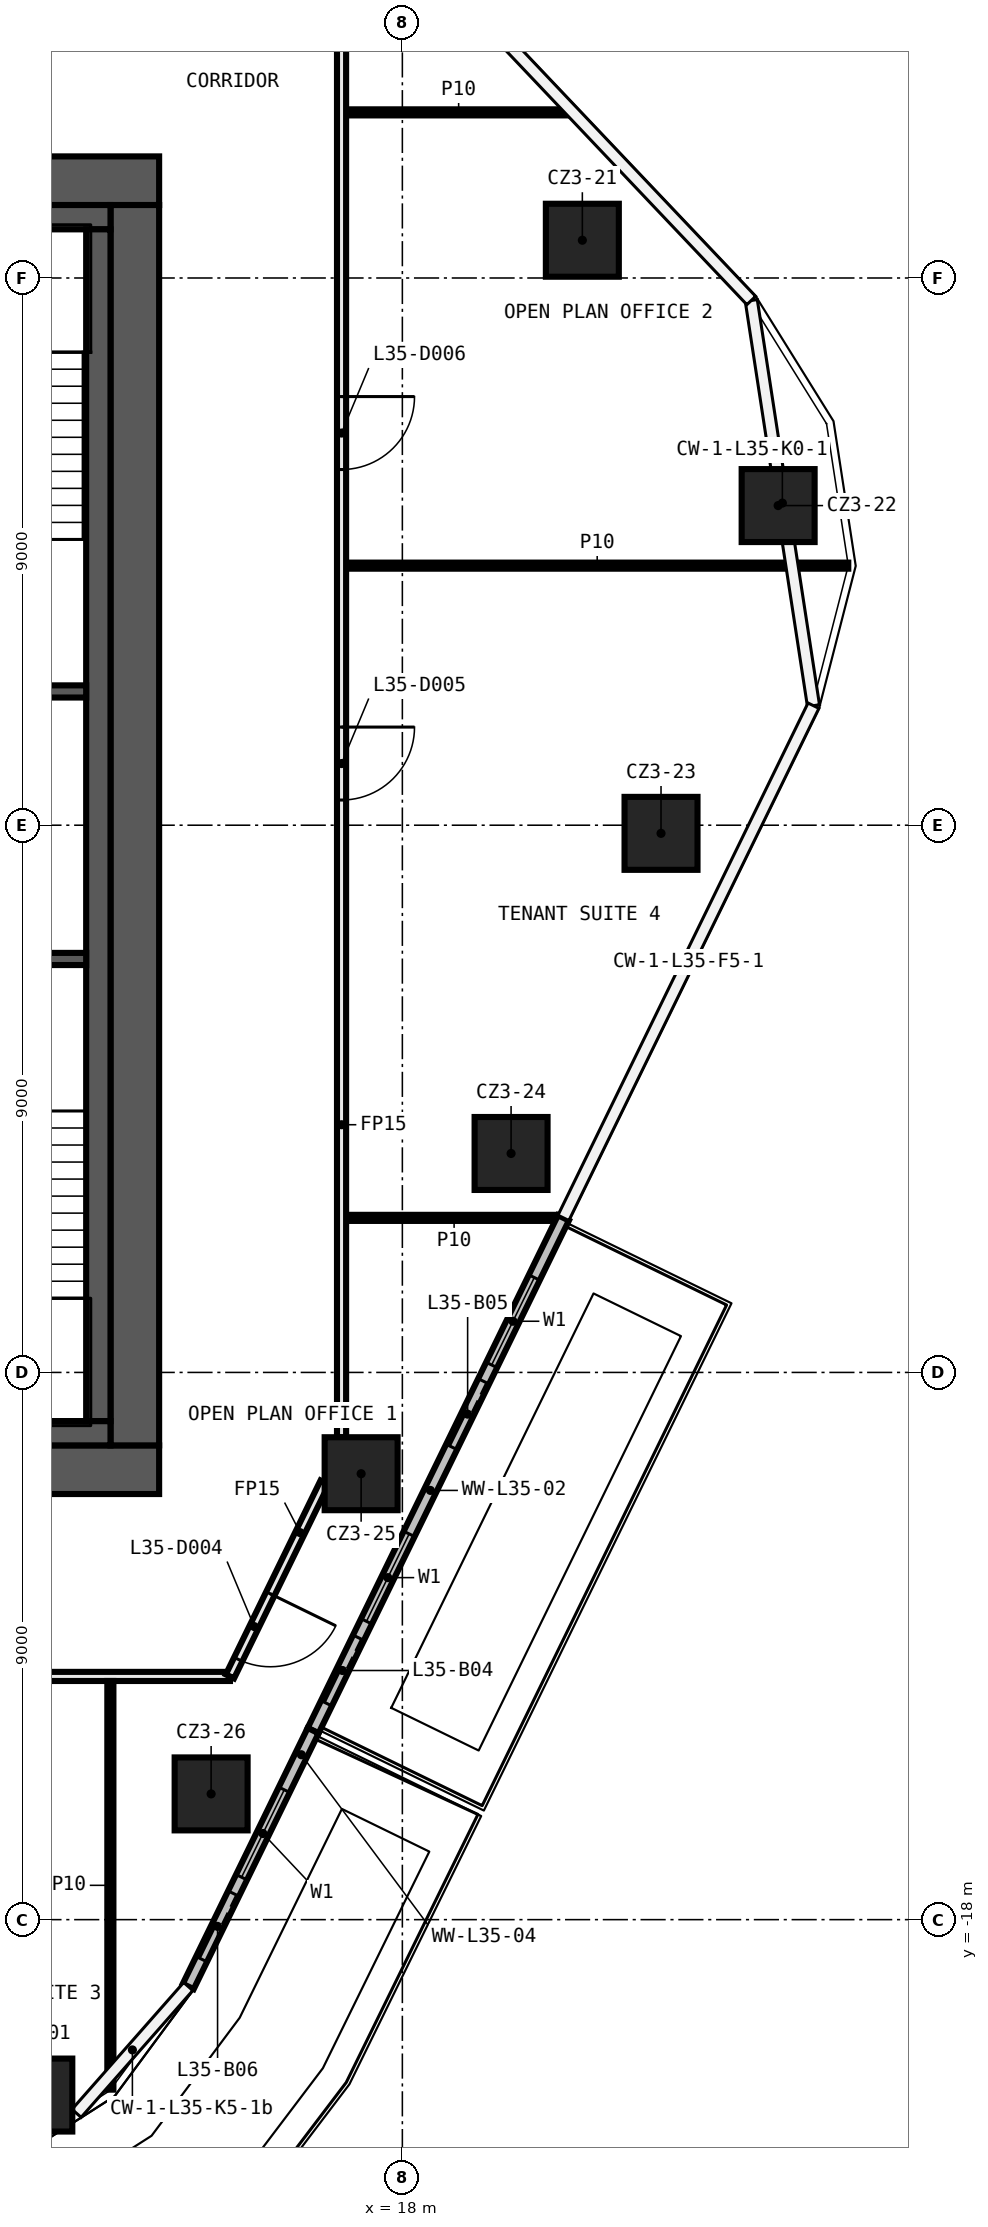
"""IFC4 building model, lengths in metres.
Left out: names, types, materials, properties, quantities, classifications, styles, units other than length and angle.
Written with IfcOpenShell. Run it as: python <this file> out.ifc"""

import sys

from ifc_helpers import new_model, si_unit, direction, frame, frame_2d, origin, origin_2d, place, context, subcontext, project, spatial, rectangle, extrude, element, fill, save


model = new_model("IFC4")
c1 = context("Model", 3, precision=1e-05, world=origin(), true_north=direction((0.0, 1.0)))
c2 = subcontext(c1, "Body", "Model", "MODEL_VIEW")
j1 = project(units=[si_unit("LENGTHUNIT", "METRE"), si_unit("PLANEANGLEUNIT", "RADIAN")], contexts=[c1])
p1 = place(None, origin())
s1 = spatial("IfcSite", under=j1, at=p1, CompositionType="ELEMENT")
p2 = place(p1, origin())
s2 = spatial("IfcBuilding", under=s1, at=p2, CompositionType="ELEMENT")
p3 = place(p2, frame((0.0, 0.0, 162.8)))
s3 = spatial("IfcBuildingStorey", under=s2, at=p3, CompositionType="ELEMENT", Elevation=162.8)
for number, where, z_axis, x_axis in (
    (1, (11.972, -20.885, 0.0), (0.0, 0.0, 1.0), (1.0, 0.0, 0.0)),
    (2, (20.96, 9.621, 0.0), (0.0, 0.0, 1.0), (1.0, 0.0, 0.0)),
    (3, (24.18, 5.257, 0.0), (0.0, 0.0, 1.0), (1.0, 0.0, 0.0)),
    (4, (22.254, -0.134, 0.0), (0.0, 0.0, 1.0), (1.0, 0.0, 0.0)),
    (5, (19.788, -5.399, 0.0), (0.0, 0.0, 1.0), (1.0, 0.0, 0.0)),
    (6, (17.322, -10.666, 0.0), (0.0, 0.0, 1.0), (1.0, 0.0, 0.0)),
    (7, (14.855, -15.932, 0.0), (0.0, 0.0, 1.0), (1.0, 0.0, 0.0)),
):
    element("IfcColumn", number, at=place(p3, frame(where, z_axis=z_axis, x_axis=x_axis)), inside=s3, PredefinedType="COLUMN", context=c2, shape_type="SweptSolid", body=[
        extrude(rectangle(XDim=1.2, YDim=1.2, at=origin_2d()), origin(), (0.0, 0.0, 1.0), 3.82),
    ])
p4 = place(p3, frame((15.165, -14.0, 0.0), z_axis=(0.0, 0.0, 1.0), x_axis=(-1.0, 0.0, 0.0)))
e8 = element("IfcWall", 8, at=p4, inside=s3, PredefinedType="PARTITIONING", context=c2, shape_type="SweptSolid", body=[
    extrude(rectangle(XDim=24.24, YDim=0.15, at=frame_2d((12.12, 0.0))), origin(), (0.0, 0.0, 1.0), 3.82),
])
p5 = place(p4, frame((15.788, 0.0, 0.0)))
e9 = element("IfcOpeningElement", 9, at=p5, cuts=e8, PredefinedType="OPENING", context=c2, shape_type="SweptSolid", body=[
    extrude(rectangle(XDim=1.2, YDim=2.1, at=frame_2d((0.6, 1.05))), frame((0.0, 0.085, 0.0), z_axis=(0.0, -1.0, 0.0), x_axis=(1.0, 0.0, 0.0)), (0.0, 0.0, 1.0), 0.17),
])
p6 = place(p4, frame((7.379, 0.0, 0.0)))
e10 = element("IfcOpeningElement", 10, at=p6, cuts=e8, PredefinedType="OPENING", context=c2, shape_type="SweptSolid", body=[
    extrude(rectangle(XDim=1.2, YDim=2.1, at=frame_2d((0.6, 1.05))), frame((0.0, 0.085, 0.0), z_axis=(0.0, -1.0, 0.0), x_axis=(1.0, 0.0, 0.0)), (0.0, 0.0, 1.0), 0.17),
])
p7 = place(p4, frame((3.323, 0.0, 0.0)))
e11 = element("IfcOpeningElement", 11, at=p7, cuts=e8, PredefinedType="OPENING", context=c2, shape_type="SweptSolid", body=[
    extrude(rectangle(XDim=1.2, YDim=2.1, at=frame_2d((0.6, 1.05))), frame((0.0, 0.085, 0.0), z_axis=(0.0, -1.0, 0.0), x_axis=(1.0, 0.0, 0.0)), (0.0, 0.0, 1.0), 0.17),
])
p8 = place(p3, frame((17.075, -6.458, 0.0), z_axis=(0.0, 0.0, 1.0), x_axis=(1.0, 0.0, 0.0)))
e12 = element("IfcWall", 12, at=p8, inside=s3, PredefinedType="PARTITIONING", context=c2, shape_type="SweptSolid", body=[
    extrude(rectangle(XDim=3.552, YDim=0.1, at=frame_2d((1.776, 0.0))), origin(), (0.0, 0.0, 1.0), 3.82),
])
p9 = place(p3, frame((17.075, 4.269, 0.0), z_axis=(0.0, 0.0, 1.0), x_axis=(1.0, 0.0, 0.0)))
e13 = element("IfcWall", 13, at=p9, inside=s3, PredefinedType="PARTITIONING", context=c2, shape_type="SweptSolid", body=[
    extrude(rectangle(XDim=8.259, YDim=0.1, at=frame_2d((4.129, 0.0))), origin(), (0.0, 0.0, 1.0), 3.82),
])
p10 = place(p3, frame((17.075, 11.724, 0.0), z_axis=(0.0, 0.0, 1.0), x_axis=(1.0, 0.0, 0.0)))
e14 = element("IfcWall", 14, at=p10, inside=s3, PredefinedType="PARTITIONING", context=c2, shape_type="SweptSolid", body=[
    extrude(rectangle(XDim=3.701, YDim=0.1, at=frame_2d((1.851, 0.0))), origin(), (0.0, 0.0, 1.0), 3.82),
])
p11 = place(p3, frame((16.722, -10.809, 0.0), z_axis=(0.0, 0.0, 1.0), x_axis=(-0.438666135365, -0.898650110824, 0.0)))
e15 = element("IfcWall", 15, at=p11, inside=s3, PredefinedType="PARTITIONING", context=c2, shape_type="SweptSolid", body=[
    extrude(rectangle(XDim=3.55, YDim=0.15, at=frame_2d((1.775, 0.0))), origin(), (0.0, 0.0, 1.0), 3.82),
])
p12 = place(p11, frame((2.038, 0.0, 0.0)))
e16 = element("IfcOpeningElement", 16, at=p12, cuts=e15, PredefinedType="OPENING", context=c2, shape_type="SweptSolid", body=[
    extrude(rectangle(XDim=1.2, YDim=2.1, at=frame_2d((0.6, 1.05))), frame((0.0, 0.085, 0.0), z_axis=(0.0, -1.0, 0.0), x_axis=(1.0, 0.0, 0.0)), (0.0, 0.0, 1.0), 0.17),
])
p13 = place(p3, frame((17.0, 13.106, 0.0), z_axis=(0.0, 0.0, 1.0), x_axis=(0.0, -1.0, 0.0)))
e17 = element("IfcWall", 17, at=p13, inside=s3, PredefinedType="PARTITIONING", context=c2, shape_type="SweptSolid", body=[
    extrude(rectangle(XDim=23.172, YDim=0.15, at=frame_2d((11.586, 0.0))), origin(), (0.0, 0.0, 1.0), 3.82),
])
p14 = place(p13, frame((11.492, 0.0, 0.0)))
e18 = element("IfcOpeningElement", 18, at=p14, cuts=e17, PredefinedType="OPENING", context=c2, shape_type="SweptSolid", body=[
    extrude(rectangle(XDim=1.2, YDim=2.1, at=frame_2d((0.6, 1.05))), frame((0.0, 0.085, 0.0), z_axis=(0.0, -1.0, 0.0), x_axis=(1.0, 0.0, 0.0)), (0.0, 0.0, 1.0), 0.17),
])
p15 = place(p13, frame((6.056, 0.0, 0.0)))
e19 = element("IfcOpeningElement", 19, at=p15, cuts=e17, PredefinedType="OPENING", context=c2, shape_type="SweptSolid", body=[
    extrude(rectangle(XDim=1.2, YDim=2.1, at=frame_2d((0.6, 1.05))), frame((0.0, 0.085, 0.0), z_axis=(0.0, -1.0, 0.0), x_axis=(1.0, 0.0, 0.0)), (0.0, 0.0, 1.0), 0.17),
])
p16 = place(p3, frame((13.198, -20.796, 0.0), z_axis=(0.0, 0.0, 1.0), x_axis=(0.0, 1.0, 0.0)))
e20 = element("IfcWall", 20, at=p16, inside=s3, PredefinedType="PARTITIONING", context=c2, shape_type="SweptSolid", body=[
    extrude(rectangle(XDim=6.721, YDim=0.1, at=frame_2d((3.361, 0.0))), origin(), (0.0, 0.0, 1.0), 3.82),
])
p17 = place(p3, frame((16.533, -14.891, 0.0), z_axis=(0.0, 0.0, 1.0), x_axis=(0.438659913387, 0.898653147987, 0.0)))
e21 = element("IfcWall", 21, at=p17, inside=s3, PredefinedType="SOLIDWALL", context=c2, shape_type="SweptSolid", body=[
    extrude(rectangle(XDim=9.384, YDim=0.2, at=frame_2d((4.692, 0.0))), origin(), (0.0, 0.0, 1.0), 3.82),
])
p18 = place(p17, frame((2.0, 0.0, 0.6)))
e22 = element("IfcOpeningElement", 22, at=p18, cuts=e21, PredefinedType="OPENING", context=c2, shape_type="SweptSolid", body=[
    extrude(rectangle(XDim=1.6, YDim=2.4, at=frame_2d((0.8, 1.2))), frame((0.0, 0.11, 0.0), z_axis=(0.0, -1.0, 0.0), x_axis=(1.0, 0.0, 0.0)), (0.0, 0.0, 1.0), 0.22),
])
p19 = place(p17, frame((0.5, 0.0, 0.0)))
e23 = element("IfcOpeningElement", 23, at=p19, cuts=e21, PredefinedType="OPENING", context=c2, shape_type="SweptSolid", body=[
    extrude(rectangle(XDim=1.2, YDim=2.4, at=frame_2d((0.6, 1.2))), frame((0.0, 0.11, 0.0), z_axis=(0.0, -1.0, 0.0), x_axis=(1.0, 0.0, 0.0)), (0.0, 0.0, 1.0), 0.22),
])
p20 = place(p17, frame((6.692, 0.0, 0.6)))
e24 = element("IfcOpeningElement", 24, at=p20, cuts=e21, PredefinedType="OPENING", context=c2, shape_type="SweptSolid", body=[
    extrude(rectangle(XDim=1.6, YDim=2.4, at=frame_2d((0.8, 1.2))), frame((0.0, 0.11, 0.0), z_axis=(0.0, -1.0, 0.0), x_axis=(1.0, 0.0, 0.0)), (0.0, 0.0, 1.0), 0.22),
])
p21 = place(p17, frame((5.192, 0.0, 0.0)))
e25 = element("IfcOpeningElement", 25, at=p21, cuts=e21, PredefinedType="OPENING", context=c2, shape_type="SweptSolid", body=[
    extrude(rectangle(XDim=1.2, YDim=2.4, at=frame_2d((0.6, 1.2))), frame((0.0, 0.11, 0.0), z_axis=(0.0, -1.0, 0.0), x_axis=(1.0, 0.0, 0.0)), (0.0, 0.0, 1.0), 0.22),
])
p22 = place(p3, frame((14.479, -19.099, 0.0), z_axis=(0.0, 0.0, 1.0), x_axis=(0.438663973521, 0.898651166101, 0.0)))
e26 = element("IfcWall", 26, at=p22, inside=s3, PredefinedType="SOLIDWALL", context=c2, shape_type="SweptSolid", body=[
    extrude(rectangle(XDim=4.683, YDim=0.2, at=frame_2d((2.341, 0.0))), origin(), (0.0, 0.0, 1.0), 3.82),
])
p23 = place(p22, frame((2.0, 0.0, 0.6)))
e27 = element("IfcOpeningElement", 27, at=p23, cuts=e26, PredefinedType="OPENING", context=c2, shape_type="SweptSolid", body=[
    extrude(rectangle(XDim=1.6, YDim=2.4, at=frame_2d((0.8, 1.2))), frame((0.0, 0.11, 0.0), z_axis=(0.0, -1.0, 0.0), x_axis=(1.0, 0.0, 0.0)), (0.0, 0.0, 1.0), 0.22),
])
p24 = place(p22, frame((0.5, 0.0, 0.0)))
e28 = element("IfcOpeningElement", 28, at=p24, cuts=e26, PredefinedType="OPENING", context=c2, shape_type="SweptSolid", body=[
    extrude(rectangle(XDim=1.2, YDim=2.4, at=frame_2d((0.6, 1.2))), frame((0.0, 0.11, 0.0), z_axis=(0.0, -1.0, 0.0), x_axis=(1.0, 0.0, 0.0)), (0.0, 0.0, 1.0), 0.22),
])
p25 = place(p3, frame((-14.0, 10.6, 0.0), z_axis=(0.0, 0.0, 1.0), x_axis=(1.0, 0.0, 0.0)))
e29 = element("IfcWall", 29, at=p25, inside=s3, PredefinedType="SHEAR", context=c2, shape_type="SweptSolid", body=[
    extrude(rectangle(XDim=28.0, YDim=0.8, at=frame_2d((14.0, 0.0))), origin(), (0.0, 0.0, 1.0), 3.82),
])
p26 = place(p25, frame((15.9, 0.0, 0.0)))
e30 = element("IfcOpeningElement", 30, at=p26, cuts=e29, PredefinedType="OPENING", context=c2, shape_type="SweptSolid", body=[
    extrude(rectangle(XDim=1.6, YDim=2.1, at=frame_2d((0.8, 1.05))), frame((0.0, 0.41, 0.0), z_axis=(0.0, -1.0, 0.0), x_axis=(1.0, 0.0, 0.0)), (0.0, 0.0, 1.0), 0.82),
])
p27 = place(p3, frame((14.0, -10.6, 0.0), z_axis=(0.0, 0.0, 1.0), x_axis=(-1.0, 0.0, 0.0)))
e31 = element("IfcWall", 31, at=p27, inside=s3, PredefinedType="SHEAR", context=c2, shape_type="SweptSolid", body=[
    extrude(rectangle(XDim=28.0, YDim=0.8, at=frame_2d((14.0, 0.0))), origin(), (0.0, 0.0, 1.0), 3.82),
])
p28 = place(p27, frame((5.1, 0.0, 0.0)))
e32 = element("IfcOpeningElement", 32, at=p28, cuts=e31, PredefinedType="OPENING", context=c2, shape_type="SweptSolid", body=[
    extrude(rectangle(XDim=1.6, YDim=2.1, at=frame_2d((0.8, 1.05))), frame((0.0, 0.41, 0.0), z_axis=(0.0, -1.0, 0.0), x_axis=(1.0, 0.0, 0.0)), (0.0, 0.0, 1.0), 0.82),
])
p29 = place(p3, frame((13.6, 10.2, 0.0), z_axis=(0.0, 0.0, 1.0), x_axis=(0.0, -1.0, 0.0)))
e33 = element("IfcWall", 33, at=p29, inside=s3, PredefinedType="SHEAR", context=c2, shape_type="SweptSolid", body=[
    extrude(rectangle(XDim=20.4, YDim=0.8, at=frame_2d((10.2, 0.0))), origin(), (0.0, 0.0, 1.0), 3.82),
])
p30 = place(p3, frame((3.9, 10.0, 0.0), z_axis=(0.0, 0.0, 1.0), x_axis=(1.0, 0.0, 0.0)))
e34 = element("IfcWall", 34, at=p30, inside=s3, PredefinedType="SHEAR", context=c2, shape_type="SweptSolid", body=[
    extrude(rectangle(XDim=9.3, YDim=0.4, at=frame_2d((4.65, 0.0))), origin(), (0.0, 0.0, 1.0), 3.82),
])
p31 = place(p3, frame((13.2, -10.0, 0.0), z_axis=(0.0, 0.0, 1.0), x_axis=(-1.0, 0.0, 0.0)))
e35 = element("IfcWall", 35, at=p31, inside=s3, PredefinedType="SHEAR", context=c2, shape_type="SweptSolid", body=[
    extrude(rectangle(XDim=3.9, YDim=0.4, at=frame_2d((1.95, 0.0))), origin(), (0.0, 0.0, 1.0), 3.82),
])
p32 = place(p3, frame((13.0, 9.8, 0.0), z_axis=(0.0, 0.0, 1.0), x_axis=(0.0, -1.0, 0.0)))
e36 = element("IfcWall", 36, at=p32, inside=s3, PredefinedType="SHEAR", context=c2, shape_type="SweptSolid", body=[
    extrude(rectangle(XDim=19.6, YDim=0.4, at=frame_2d((9.8, 0.0))), origin(), (0.0, 0.0, 1.0), 3.82),
])
for number, where, z_axis, x_axis in (
    (37, (9.45, 2.2, 0.0), (0.0, 0.0, 1.0), (1.0, 0.0, 0.0)),
    (38, (9.45, -2.2, 0.0), (0.0, 0.0, 1.0), (1.0, 0.0, 0.0)),
):
    element("IfcWall", number, at=place(p3, frame(where, z_axis=z_axis, x_axis=x_axis)), inside=s3, PredefinedType="SHEAR", context=c2, shape_type="SweptSolid", body=[
        extrude(rectangle(XDim=3.35, YDim=0.2, at=frame_2d((1.675, 0.0))), origin(), (0.0, 0.0, 1.0), 3.82),
    ])
p33 = place(p12, origin())
e39 = element("IfcDoor", 39, at=p33, inside=s3, OperationType="SINGLE_SWING_LEFT", PredefinedType="DOOR", context=c2, shape_type="SweptSolid", body=[
    extrude(rectangle(XDim=1.2, YDim=2.1, at=frame_2d((0.6, 1.05))), frame((0.0, 0.025, 0.0), z_axis=(0.0, -1.0, 0.0), x_axis=(1.0, 0.0, 0.0)), (0.0, 0.0, 1.0), 0.05),
])
fill(e16, e39)
p34 = place(p14, origin())
e40 = element("IfcDoor", 40, at=p34, inside=s3, OperationType="SINGLE_SWING_RIGHT", PredefinedType="DOOR", context=c2, shape_type="SweptSolid", body=[
    extrude(rectangle(XDim=1.2, YDim=2.1, at=frame_2d((0.6, 1.05))), frame((0.0, 0.025, 0.0), z_axis=(0.0, -1.0, 0.0), x_axis=(1.0, 0.0, 0.0)), (0.0, 0.0, 1.0), 0.05),
])
fill(e18, e40)
p35 = place(p15, origin())
e41 = element("IfcDoor", 41, at=p35, inside=s3, OperationType="SINGLE_SWING_LEFT", PredefinedType="DOOR", context=c2, shape_type="SweptSolid", body=[
    extrude(rectangle(XDim=1.2, YDim=2.1, at=frame_2d((0.6, 1.05))), frame((0.0, 0.025, 0.0), z_axis=(0.0, -1.0, 0.0), x_axis=(1.0, 0.0, 0.0)), (0.0, 0.0, 1.0), 0.05),
])
fill(e19, e41)
p36 = place(p18, origin())
e42 = element("IfcWindow", 42, at=p36, inside=s3, PartitioningType="SINGLE_PANEL", PredefinedType="WINDOW", context=c2, shape_type="SweptSolid", body=[
    extrude(rectangle(XDim=1.6, YDim=2.4, at=frame_2d((0.8, 1.2))), frame((0.0, 0.03, 0.0), z_axis=(0.0, -1.0, 0.0), x_axis=(1.0, 0.0, 0.0)), (0.0, 0.0, 1.0), 0.06),
])
fill(e22, e42)
p37 = place(p19, origin())
e43 = element("IfcDoor", 43, at=p37, inside=s3, OperationType="SLIDING_TO_LEFT", PredefinedType="DOOR", context=c2, shape_type="SweptSolid", body=[
    extrude(rectangle(XDim=1.2, YDim=2.4, at=frame_2d((0.6, 1.2))), frame((0.0, 0.025, 0.0), z_axis=(0.0, -1.0, 0.0), x_axis=(1.0, 0.0, 0.0)), (0.0, 0.0, 1.0), 0.05),
])
fill(e23, e43)
p38 = place(p20, origin())
e44 = element("IfcWindow", 44, at=p38, inside=s3, PartitioningType="SINGLE_PANEL", PredefinedType="WINDOW", context=c2, shape_type="SweptSolid", body=[
    extrude(rectangle(XDim=1.6, YDim=2.4, at=frame_2d((0.8, 1.2))), frame((0.0, 0.03, 0.0), z_axis=(0.0, -1.0, 0.0), x_axis=(1.0, 0.0, 0.0)), (0.0, 0.0, 1.0), 0.06),
])
fill(e24, e44)
p39 = place(p21, origin())
e45 = element("IfcDoor", 45, at=p39, inside=s3, OperationType="SLIDING_TO_LEFT", PredefinedType="DOOR", context=c2, shape_type="SweptSolid", body=[
    extrude(rectangle(XDim=1.2, YDim=2.4, at=frame_2d((0.6, 1.2))), frame((0.0, 0.025, 0.0), z_axis=(0.0, -1.0, 0.0), x_axis=(1.0, 0.0, 0.0)), (0.0, 0.0, 1.0), 0.05),
])
fill(e25, e45)
p40 = place(p23, origin())
e46 = element("IfcWindow", 46, at=p40, inside=s3, PartitioningType="SINGLE_PANEL", PredefinedType="WINDOW", context=c2, shape_type="SweptSolid", body=[
    extrude(rectangle(XDim=1.6, YDim=2.4, at=frame_2d((0.8, 1.2))), frame((0.0, 0.03, 0.0), z_axis=(0.0, -1.0, 0.0), x_axis=(1.0, 0.0, 0.0)), (0.0, 0.0, 1.0), 0.06),
])
fill(e27, e46)
p41 = place(p24, origin())
e47 = element("IfcDoor", 47, at=p41, inside=s3, OperationType="SLIDING_TO_LEFT", PredefinedType="DOOR", context=c2, shape_type="SweptSolid", body=[
    extrude(rectangle(XDim=1.2, YDim=2.4, at=frame_2d((0.6, 1.2))), frame((0.0, 0.025, 0.0), z_axis=(0.0, -1.0, 0.0), x_axis=(1.0, 0.0, 0.0)), (0.0, 0.0, 1.0), 0.05),
])
fill(e28, e47)
save(model, sys.argv[1])
